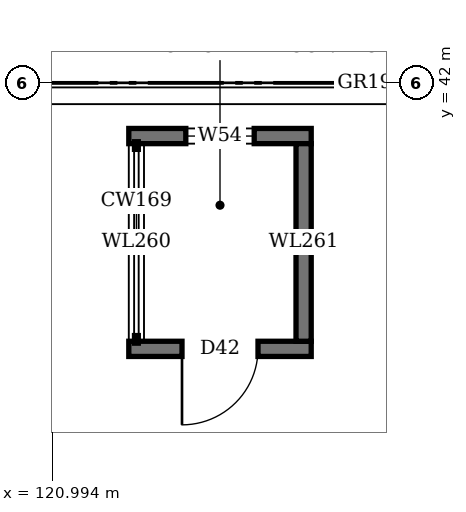
"""IFC4 building model, lengths in metres.
Left out: names, types, materials, properties, quantities, classifications, styles, units other than length and angle.
Written with IfcOpenShell. Run it as: python <this file> out.ifc"""

import sys

from ifc_helpers import new_model, si_unit, direction, frame, frame_2d, origin, place, context, subcontext, project, spatial, rectangle, extrude, element, fill, save


model = new_model("IFC4")
c1 = context("Model", 3, precision=1e-05, world=origin(), true_north=direction((0.0, 1.0)))
c2 = subcontext(c1, "Body", "Model", "MODEL_VIEW")
j1 = project(units=[si_unit("LENGTHUNIT", "METRE"), si_unit("PLANEANGLEUNIT", "RADIAN")], contexts=[c1])
p1 = place(None, origin())
s1 = spatial("IfcSite", under=j1, at=p1, CompositionType="ELEMENT")
p2 = place(p1, origin())
s2 = spatial("IfcBuilding", under=s1, at=p2, CompositionType="ELEMENT")
p3 = place(p2, origin())
s3 = spatial("IfcBuildingStorey", under=s2, at=p3, CompositionType="ELEMENT", Elevation=0.0)
p4 = place(p3, frame((122.0, 38.5, 0.0), z_axis=(0.0, 0.0, 1.0), x_axis=(1.0, 0.0, 0.0)))
e1 = element("IfcWall", 1, at=p4, inside=s3, PredefinedType="SOLIDWALL", context=c2, shape_type="SweptSolid", body=[
    extrude(rectangle(XDim=2.4, YDim=0.2, at=frame_2d((1.2, 0.0))), origin(), (0.0, 0.0, 1.0), 2.65),
])
p5 = place(p4, frame((0.7, 0.0, 0.0)))
e2 = element("IfcOpeningElement", 2, at=p5, cuts=e1, PredefinedType="OPENING", context=c2, shape_type="SweptSolid", body=[
    extrude(rectangle(XDim=1.0, YDim=2.1, at=frame_2d((0.5, 1.05))), frame((0.0, 0.11, 0.0), z_axis=(0.0, -1.0, 0.0), x_axis=(1.0, 0.0, 0.0)), (0.0, 0.0, 1.0), 0.22),
])
p6 = place(p3, frame((122.0, 41.3, 0.0), z_axis=(0.0, 0.0, 1.0), x_axis=(1.0, 0.0, 0.0)))
e3 = element("IfcWall", 3, at=p6, inside=s3, PredefinedType="SOLIDWALL", context=c2, shape_type="SweptSolid", body=[
    extrude(rectangle(XDim=2.4, YDim=0.2, at=frame_2d((1.2, 0.0))), origin(), (0.0, 0.0, 1.0), 2.65),
])
p7 = place(p6, frame((0.75, 0.0, 0.9)))
e4 = element("IfcOpeningElement", 4, at=p7, cuts=e3, PredefinedType="OPENING", context=c2, shape_type="SweptSolid", body=[
    extrude(rectangle(XDim=0.9, YDim=1.2, at=frame_2d((0.45, 0.6))), frame((0.0, 0.11, 0.0), z_axis=(0.0, -1.0, 0.0), x_axis=(1.0, 0.0, 0.0)), (0.0, 0.0, 1.0), 0.22),
])
p8 = place(p3, frame((122.1, 38.6, 0.0), z_axis=(0.0, 0.0, 1.0), x_axis=(0.0, 1.0, 0.0)))
e5 = element("IfcWall", 5, at=p8, inside=s3, PredefinedType="SOLIDWALL", context=c2, shape_type="SweptSolid", body=[
    extrude(rectangle(XDim=2.6, YDim=0.2, at=frame_2d((1.3, 0.0))), origin(), (0.0, 0.0, 1.0), 1.0),
])
p9 = place(p3, frame((124.3, 38.6, 0.0), z_axis=(0.0, 0.0, 1.0), x_axis=(0.0, 1.0, 0.0)))
e6 = element("IfcWall", 6, at=p9, inside=s3, PredefinedType="SOLIDWALL", context=c2, shape_type="SweptSolid", body=[
    extrude(rectangle(XDim=2.6, YDim=0.2, at=frame_2d((1.3, 0.0))), origin(), (0.0, 0.0, 1.0), 2.65),
])
p10 = place(p5, frame((1.0, 0.0, 0.0), z_axis=(0.0, 0.0, 1.0), x_axis=(-1.0, 0.0, 0.0)))
e7 = element("IfcDoor", 7, at=p10, inside=s3, OperationType="SINGLE_SWING_RIGHT", PredefinedType="DOOR", context=c2, shape_type="SweptSolid", body=[
    extrude(rectangle(XDim=1.0, YDim=2.1, at=frame_2d((0.5, 1.05))), frame((0.0, 0.025, 0.0), z_axis=(0.0, -1.0, 0.0), x_axis=(1.0, 0.0, 0.0)), (0.0, 0.0, 1.0), 0.05),
])
fill(e2, e7)
p11 = place(p7, origin())
e8 = element("IfcWindow", 8, at=p11, inside=s3, PartitioningType="SINGLE_PANEL", PredefinedType="WINDOW", context=c2, shape_type="SweptSolid", body=[
    extrude(rectangle(XDim=0.9, YDim=1.2, at=frame_2d((0.45, 0.6))), frame((0.0, 0.03, 0.0), z_axis=(0.0, -1.0, 0.0), x_axis=(1.0, 0.0, 0.0)), (0.0, 0.0, 1.0), 0.06),
])
fill(e4, e8)
save(model, sys.argv[1])
